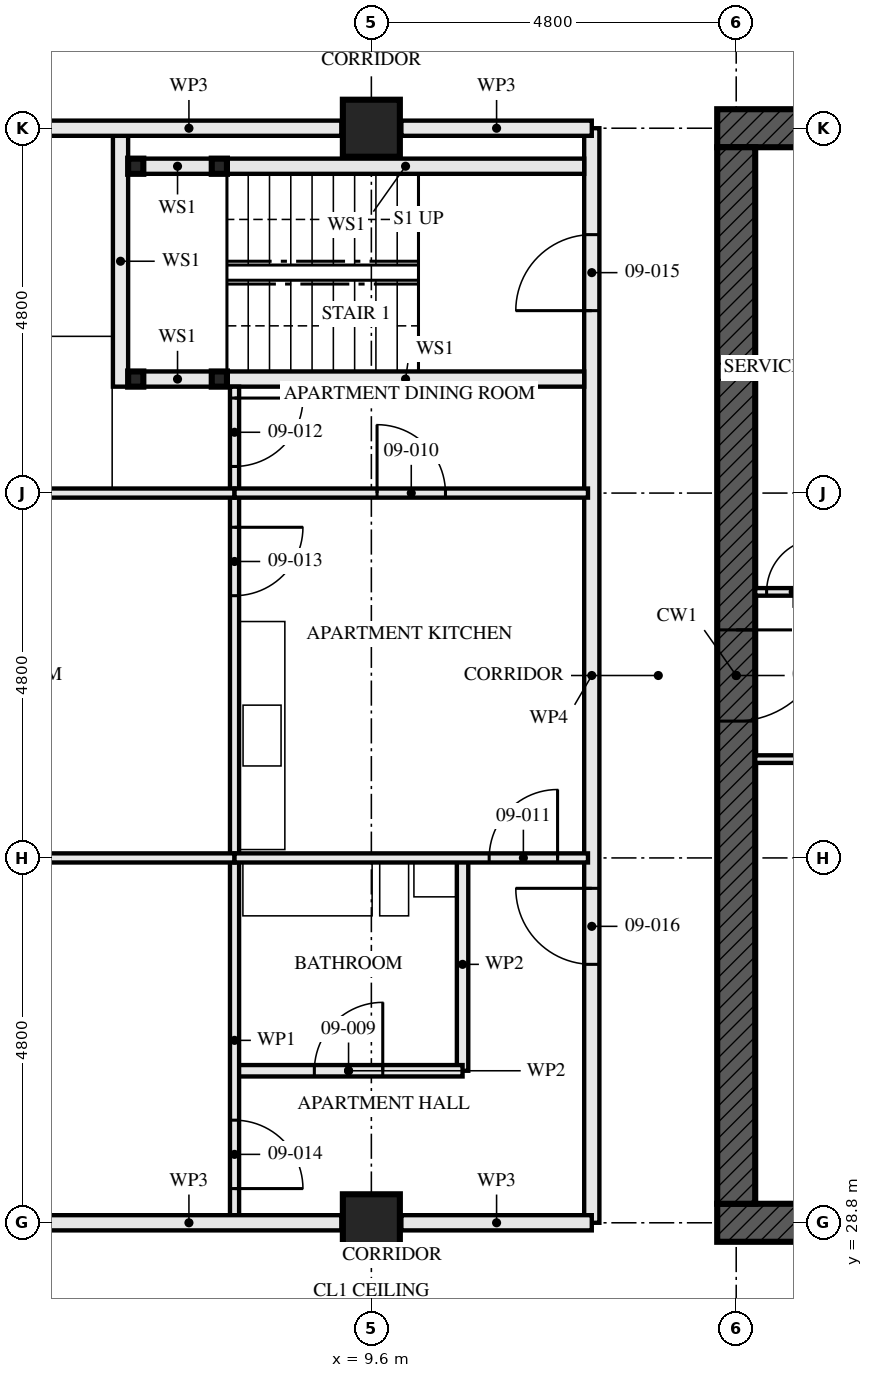
"""IFC4 building model, lengths in metres.
Left out: names, types, materials, properties, quantities, classifications, styles, units other than length and angle.
Written with IfcOpenShell. Run it as: python <this file> out.ifc"""

import sys

from ifc_helpers import new_model, si_unit, direction, frame, frame_2d, origin, origin_2d, place, context, subcontext, project, spatial, rectangle, hollow_rectangle, extrude, element, fill, save


model = new_model("IFC4")
c1 = context("Model", 3, precision=1e-05, world=origin(), true_north=direction((0.0, 1.0)))
c2 = subcontext(c1, "Body", "Model", "MODEL_VIEW")
j1 = project(units=[si_unit("LENGTHUNIT", "METRE"), si_unit("PLANEANGLEUNIT", "RADIAN")], contexts=[c1])
p1 = place(None, origin())
s1 = spatial("IfcSite", under=j1, at=p1, CompositionType="ELEMENT")
p2 = place(p1, origin())
s2 = spatial("IfcBuilding", under=s1, at=p2, CompositionType="ELEMENT")
p3 = place(p2, frame((0.0, 0.0, 37.5)))
s3 = spatial("IfcBuildingStorey", under=s2, at=p3, CompositionType="ELEMENT", Elevation=37.5)
for number, where, z_axis, x_axis in (
    (1, (9.6, 28.8, 0.0), (0.0, 0.0, 1.0), (0.0, 1.0, 0.0)),
    (2, (9.6, 43.2, 0.0), (0.0, 0.0, 1.0), (0.0, 1.0, 0.0)),
):
    element("IfcColumn", number, at=place(p3, frame(where, z_axis=z_axis, x_axis=x_axis)), inside=s3, PredefinedType="COLUMN", context=c2, shape_type="SweptSolid", body=[
        extrude(hollow_rectangle(XDim=0.75, YDim=0.75, WallThickness=0.08, at=origin_2d()), origin(), (0.0, 0.0, 1.0), 3.5),
    ])
p4 = place(p3, frame((14.15, 28.8, -0.17), z_axis=(0.0, 0.0, 1.0), x_axis=(1.0, 0.0, 0.0)))
e3 = element("IfcWall", 3, at=p4, inside=s3, PredefinedType="SHEAR", context=c2, shape_type="SweptSolid", body=[
    extrude(rectangle(XDim=14.9, YDim=0.5, at=frame_2d((7.45, 0.0))), origin(), (0.0, 0.0, 1.0), 3.5),
])
p5 = place(p4, frame((6.85, 0.0, 0.17)))
e4 = element("IfcOpeningElement", 4, at=p5, cuts=e3, PredefinedType="OPENING", context=c2, shape_type="SweptSolid", body=[
    extrude(rectangle(XDim=1.2, YDim=2.1, at=frame_2d((0.6, 1.05))), frame((0.0, 0.26, 0.0), z_axis=(0.0, -1.0, 0.0), x_axis=(1.0, 0.0, 0.0)), (0.0, 0.0, 1.0), 0.521),
])
p6 = place(p3, frame((29.05, 43.2, -0.17), z_axis=(0.0, 0.0, 1.0), x_axis=(-1.0, 0.0, 0.0)))
e5 = element("IfcWall", 5, at=p6, inside=s3, PredefinedType="SHEAR", context=c2, shape_type="SweptSolid", body=[
    extrude(rectangle(XDim=14.9, YDim=0.5, at=frame_2d((7.45, 0.0))), origin(), (0.0, 0.0, 1.0), 3.5),
])
p7 = place(p6, frame((6.85, 0.0, 0.17)))
e6 = element("IfcOpeningElement", 6, at=p7, cuts=e5, PredefinedType="OPENING", context=c2, shape_type="SweptSolid", body=[
    extrude(rectangle(XDim=1.2, YDim=2.1, at=frame_2d((0.6, 1.05))), frame((0.0, 0.26, 0.0), z_axis=(0.0, -1.0, 0.0), x_axis=(1.0, 0.0, 0.0)), (0.0, 0.0, 1.0), 0.521),
])
p8 = place(p3, frame((14.4, 42.95, -0.17), z_axis=(0.0, 0.0, 1.0), x_axis=(0.0, -1.0, 0.0)))
e7 = element("IfcWall", 7, at=p8, inside=s3, PredefinedType="SHEAR", context=c2, shape_type="SweptSolid", body=[
    extrude(rectangle(XDim=13.9, YDim=0.5, at=frame_2d((6.95, 0.0))), origin(), (0.0, 0.0, 1.0), 3.5),
])
p9 = place(p8, frame((6.35, 0.0, 0.17)))
e8 = element("IfcOpeningElement", 8, at=p9, cuts=e7, PredefinedType="OPENING", context=c2, shape_type="SweptSolid", body=[
    extrude(rectangle(XDim=1.2, YDim=2.1, at=frame_2d((0.6, 1.05))), frame((0.0, 0.26, 0.0), z_axis=(0.0, -1.0, 0.0), x_axis=(1.0, 0.0, 0.0)), (0.0, 0.0, 1.0), 0.521),
])
for number, where, z_axis, x_axis in (
    (9, (6.5, 42.7, 0.0), (0.0, 0.0, 1.0), (1.0, 0.0, 0.0)),
    (10, (6.5, 39.9, 0.0), (0.0, 0.0, 1.0), (1.0, 0.0, 0.0)),
    (11, (7.6, 42.7, 0.0), (0.0, 0.0, 1.0), (1.0, 0.0, 0.0)),
    (12, (7.6, 39.9, 0.0), (0.0, 0.0, 1.0), (1.0, 0.0, 0.0)),
):
    element("IfcColumn", number, at=place(p3, frame(where, z_axis=z_axis, x_axis=x_axis)), inside=s3, PredefinedType="COLUMN", context=c2, shape_type="SweptSolid", body=[
        extrude(hollow_rectangle(XDim=0.2, YDim=0.2, WallThickness=0.008, at=origin_2d()), origin(), (0.0, 0.0, 1.0), 3.33),
    ])
p10 = place(p3, frame((6.6, 42.7, 0.0), z_axis=(0.0, 0.0, 1.0), x_axis=(1.0, 0.0, 0.0)))
e13 = element("IfcWall", 13, at=p10, inside=s3, PredefinedType="SOLIDWALL", context=c2, shape_type="SweptSolid", body=[
    extrude(rectangle(XDim=0.9, YDim=0.2, at=frame_2d((0.45, 0.0))), origin(), (0.0, 0.0, 1.0), 2.99),
])
p11 = place(p3, frame((7.7, 42.7, 0.0), z_axis=(0.0, 0.0, 1.0), x_axis=(1.0, 0.0, 0.0)))
e14 = element("IfcWall", 14, at=p11, inside=s3, PredefinedType="SOLIDWALL", context=c2, shape_type="SweptSolid", body=[
    extrude(rectangle(XDim=4.7, YDim=0.2, at=frame_2d((2.35, 0.0))), origin(), (0.0, 0.0, 1.0), 2.99),
])
p12 = place(p3, frame((6.6, 39.9, 0.0), z_axis=(0.0, 0.0, 1.0), x_axis=(1.0, 0.0, 0.0)))
e15 = element("IfcWall", 15, at=p12, inside=s3, PredefinedType="SOLIDWALL", context=c2, shape_type="SweptSolid", body=[
    extrude(rectangle(XDim=0.9, YDim=0.2, at=frame_2d((0.45, 0.0))), origin(), (0.0, 0.0, 1.0), 2.99),
])
p13 = place(p3, frame((7.7, 39.9, 0.0), z_axis=(0.0, 0.0, 1.0), x_axis=(1.0, 0.0, 0.0)))
e16 = element("IfcWall", 16, at=p13, inside=s3, PredefinedType="SOLIDWALL", context=c2, shape_type="SweptSolid", body=[
    extrude(rectangle(XDim=4.7, YDim=0.2, at=frame_2d((2.35, 0.0))), origin(), (0.0, 0.0, 1.0), 2.99),
])
p14 = place(p3, frame((6.3, 43.1, 0.0), z_axis=(0.0, 0.0, 1.0), x_axis=(0.0, -1.0, 0.0)))
e17 = element("IfcWall", 17, at=p14, inside=s3, PredefinedType="SOLIDWALL", context=c2, shape_type="SweptSolid", body=[
    extrude(rectangle(XDim=3.3, YDim=0.2, at=frame_2d((1.65, 0.0))), origin(), (0.0, 0.0, 1.0), 3.33),
])
p15 = place(p3, frame((7.8, 30.8, 0.0), z_axis=(0.0, 0.0, 1.0), x_axis=(1.0, 0.0, 0.0)))
e18 = element("IfcWall", 18, at=p15, inside=s3, PredefinedType="PARTITIONING", context=c2, shape_type="SweptSolid", body=[
    extrude(rectangle(XDim=3.0, YDim=0.15, at=frame_2d((1.5, 0.0))), origin(), (0.0, 0.0, 1.0), 3.33),
])
p16 = place(p15, frame((1.05, 0.0, 0.0)))
e19 = element("IfcOpeningElement", 19, at=p16, cuts=e18, PredefinedType="OPENING", context=c2, shape_type="SweptSolid", body=[
    extrude(rectangle(XDim=0.9, YDim=2.1, at=frame_2d((0.45, 1.05))), frame((0.0, 0.085, 0.0), z_axis=(0.0, -1.0, 0.0), x_axis=(1.0, 0.0, 0.0)), (0.0, 0.0, 1.0), 0.171),
])
p17 = place(p3, frame((10.8, 33.6, 0.0), z_axis=(0.0, 0.0, 1.0), x_axis=(0.0, -1.0, 0.0)))
e20 = element("IfcWall", 20, at=p17, inside=s3, PredefinedType="PARTITIONING", context=c2, shape_type="SweptSolid", body=[
    extrude(rectangle(XDim=2.8, YDim=0.15, at=frame_2d((1.4, 0.0))), origin(), (0.0, 0.0, 1.0), 3.33),
])
p18 = place(p3, frame((7.8, 38.4, 0.0), z_axis=(0.0, 0.0, 1.0), x_axis=(1.0, 0.0, 0.0)))
e21 = element("IfcWall", 21, at=p18, inside=s3, PredefinedType="PARTITIONING", context=c2, shape_type="SweptSolid", body=[
    extrude(rectangle(XDim=4.65, YDim=0.12, at=frame_2d((2.325, 0.0))), origin(), (0.0, 0.0, 1.0), 2.55),
])
p19 = place(p18, frame((1.875, 0.0, 0.0)))
e22 = element("IfcOpeningElement", 22, at=p19, cuts=e21, PredefinedType="OPENING", context=c2, shape_type="SweptSolid", body=[
    extrude(rectangle(XDim=0.9, YDim=2.1, at=frame_2d((0.45, 1.05))), frame((0.0, 0.071, 0.0), z_axis=(0.0, -1.0, 0.0), x_axis=(1.0, 0.0, 0.0)), (0.0, 0.0, 1.0), 0.141),
])
p20 = place(p3, frame((7.8, 33.6, 0.0), z_axis=(0.0, 0.0, 1.0), x_axis=(1.0, 0.0, 0.0)))
e23 = element("IfcWall", 23, at=p20, inside=s3, PredefinedType="PARTITIONING", context=c2, shape_type="SweptSolid", body=[
    extrude(rectangle(XDim=4.65, YDim=0.12, at=frame_2d((2.325, 0.0))), origin(), (0.0, 0.0, 1.0), 2.55),
])
p21 = place(p20, frame((3.35, 0.0, 0.0)))
e24 = element("IfcOpeningElement", 24, at=p21, cuts=e23, PredefinedType="OPENING", context=c2, shape_type="SweptSolid", body=[
    extrude(rectangle(XDim=0.9, YDim=2.1, at=frame_2d((0.45, 1.05))), frame((0.0, 0.071, 0.0), z_axis=(0.0, -1.0, 0.0), x_axis=(1.0, 0.0, 0.0)), (0.0, 0.0, 1.0), 0.141),
])
p22 = place(p3, frame((7.8, 39.8, 0.0), z_axis=(0.0, 0.0, 1.0), x_axis=(0.0, -1.0, 0.0)))
e25 = element("IfcWall", 25, at=p22, inside=s3, PredefinedType="PARTITIONING", context=c2, shape_type="SweptSolid", body=[
    extrude(rectangle(XDim=1.4, YDim=0.12, at=frame_2d((0.7, 0.0))), origin(), (0.0, 0.0, 1.0), 3.33),
])
p23 = place(p22, frame((0.15, 0.0, 0.0)))
e26 = element("IfcOpeningElement", 26, at=p23, cuts=e25, PredefinedType="OPENING", context=c2, shape_type="SweptSolid", body=[
    extrude(rectangle(XDim=0.9, YDim=2.1, at=frame_2d((0.45, 1.05))), frame((0.0, 0.071, 0.0), z_axis=(0.0, -1.0, 0.0), x_axis=(1.0, 0.0, 0.0)), (0.0, 0.0, 1.0), 0.141),
])
p24 = place(p3, frame((7.8, 38.4, 0.0), z_axis=(0.0, 0.0, 1.0), x_axis=(0.0, -1.0, 0.0)))
e27 = element("IfcWall", 27, at=p24, inside=s3, PredefinedType="PARTITIONING", context=c2, shape_type="SweptSolid", body=[
    extrude(rectangle(XDim=4.8, YDim=0.12, at=frame_2d((2.4, 0.0))), origin(), (0.0, 0.0, 1.0), 3.33),
])
p25 = place(p24, frame((0.45, 0.0, 0.0)))
e28 = element("IfcOpeningElement", 28, at=p25, cuts=e27, PredefinedType="OPENING", context=c2, shape_type="SweptSolid", body=[
    extrude(rectangle(XDim=0.9, YDim=2.1, at=frame_2d((0.45, 1.05))), frame((0.0, 0.071, 0.0), z_axis=(0.0, -1.0, 0.0), x_axis=(1.0, 0.0, 0.0)), (0.0, 0.0, 1.0), 0.141),
])
p26 = place(p3, frame((7.8, 33.6, 0.0), z_axis=(0.0, 0.0, 1.0), x_axis=(0.0, -1.0, 0.0)))
e29 = element("IfcWall", 29, at=p26, inside=s3, PredefinedType="PARTITIONING", context=c2, shape_type="SweptSolid", body=[
    extrude(rectangle(XDim=4.8, YDim=0.12, at=frame_2d((2.4, 0.0))), origin(), (0.0, 0.0, 1.0), 3.33),
])
p27 = place(p26, frame((3.45, 0.0, 0.0)))
e30 = element("IfcOpeningElement", 30, at=p27, cuts=e29, PredefinedType="OPENING", context=c2, shape_type="SweptSolid", body=[
    extrude(rectangle(XDim=0.9, YDim=2.1, at=frame_2d((0.45, 1.05))), frame((0.0, 0.071, 0.0), z_axis=(0.0, -1.0, 0.0), x_axis=(1.0, 0.0, 0.0)), (0.0, 0.0, 1.0), 0.141),
])
for number, where, z_axis, x_axis in (
    (31, (0.395, 38.4, 0.0), (0.0, 0.0, 1.0), (1.0, 0.0, 0.0)),
    (32, (0.395, 33.6, 0.0), (0.0, 0.0, 1.0), (1.0, 0.0, 0.0)),
):
    element("IfcWall", number, at=place(p3, frame(where, z_axis=z_axis, x_axis=x_axis)), inside=s3, PredefinedType="PARTITIONING", context=c2, shape_type="SweptSolid", body=[
        extrude(rectangle(XDim=7.405, YDim=0.12, at=frame_2d((3.703, 0.0))), origin(), (0.0, 0.0, 1.0), 2.55),
    ])
p28 = place(p3, frame((12.5, 43.2, 0.0), z_axis=(0.0, 0.0, 1.0), x_axis=(0.0, -1.0, 0.0)))
e33 = element("IfcWall", 33, at=p28, inside=s3, PredefinedType="PARTITIONING", context=c2, shape_type="SweptSolid", body=[
    extrude(rectangle(XDim=14.4, YDim=0.2, at=frame_2d((7.2, 0.0))), origin(), (0.0, 0.0, 1.0), 2.55),
])
p29 = place(p28, frame((1.4, 0.0, 0.0)))
e34 = element("IfcOpeningElement", 34, at=p29, cuts=e33, PredefinedType="OPENING", context=c2, shape_type="SweptSolid", body=[
    extrude(rectangle(XDim=1.0, YDim=2.1, at=frame_2d((0.5, 1.05))), frame((0.0, 0.111, 0.0), z_axis=(0.0, -1.0, 0.0), x_axis=(1.0, 0.0, 0.0)), (0.0, 0.0, 1.0), 0.221),
])
p30 = place(p28, frame((10.0, 0.0, 0.0)))
e35 = element("IfcOpeningElement", 35, at=p30, cuts=e33, PredefinedType="OPENING", context=c2, shape_type="SweptSolid", body=[
    extrude(rectangle(XDim=1.0, YDim=2.1, at=frame_2d((0.5, 1.05))), frame((0.0, 0.111, 0.0), z_axis=(0.0, -1.0, 0.0), x_axis=(1.0, 0.0, 0.0)), (0.0, 0.0, 1.0), 0.221),
])
p31 = place(p3, frame((14.65, 34.9, 0.0), z_axis=(0.0, 0.0, 1.0), x_axis=(1.0, 0.0, 0.0)))
e36 = element("IfcWall", 36, at=p31, inside=s3, PredefinedType="SOLIDWALL", context=c2, shape_type="SweptSolid", body=[
    extrude(rectangle(XDim=5.9, YDim=0.1, at=frame_2d((2.95, 0.0))), origin(), (0.0, 0.0, 1.0), 3.33),
])
p32 = place(p31, frame((1.6, 0.0, 0.0)))
e37 = element("IfcOpeningElement", 37, at=p32, cuts=e36, PredefinedType="OPENING", context=c2, shape_type="SweptSolid", body=[
    extrude(rectangle(XDim=0.7, YDim=2.1, at=frame_2d((0.35, 1.05))), frame((0.0, 0.061, 0.0), z_axis=(0.0, -1.0, 0.0), x_axis=(1.0, 0.0, 0.0)), (0.0, 0.0, 1.0), 0.121),
])
p33 = place(p3, frame((14.65, 37.1, 0.0), z_axis=(0.0, 0.0, 1.0), x_axis=(1.0, 0.0, 0.0)))
e38 = element("IfcWall", 38, at=p33, inside=s3, PredefinedType="SOLIDWALL", context=c2, shape_type="SweptSolid", body=[
    extrude(rectangle(XDim=5.9, YDim=0.1, at=frame_2d((2.95, 0.0))), origin(), (0.0, 0.0, 1.0), 3.33),
])
p34 = place(p33, frame((0.15, 0.0, 0.0)))
e39 = element("IfcOpeningElement", 39, at=p34, cuts=e38, PredefinedType="OPENING", context=c2, shape_type="SweptSolid", body=[
    extrude(rectangle(XDim=0.7, YDim=2.1, at=frame_2d((0.35, 1.05))), frame((0.0, 0.061, 0.0), z_axis=(0.0, -1.0, 0.0), x_axis=(1.0, 0.0, 0.0)), (0.0, 0.0, 1.0), 0.121),
])
p35 = place(p33, frame((1.5, 0.0, 0.0)))
e40 = element("IfcOpeningElement", 40, at=p35, cuts=e38, PredefinedType="OPENING", context=c2, shape_type="SweptSolid", body=[
    extrude(rectangle(XDim=0.9, YDim=2.1, at=frame_2d((0.45, 1.05))), frame((0.0, 0.061, 0.0), z_axis=(0.0, -1.0, 0.0), x_axis=(1.0, 0.0, 0.0)), (0.0, 0.0, 1.0), 0.121),
])
p36 = place(p3, frame((12.5, 28.8, 0.0), z_axis=(0.0, 0.0, 1.0), x_axis=(-1.0, 0.0, 0.0)))
e41 = element("IfcWall", 41, at=p36, inside=s3, PredefinedType="PARTITIONING", context=c2, shape_type="SweptSolid", body=[
    extrude(rectangle(XDim=2.505, YDim=0.2, at=frame_2d((1.252, 0.0))), origin(), (0.0, 0.0, 1.0), 2.32),
])
p37 = place(p3, frame((9.205, 28.8, 0.0), z_axis=(0.0, 0.0, 1.0), x_axis=(-1.0, 0.0, 0.0)))
e42 = element("IfcWall", 42, at=p37, inside=s3, PredefinedType="PARTITIONING", context=c2, shape_type="SweptSolid", body=[
    extrude(rectangle(XDim=4.01, YDim=0.2, at=frame_2d((2.005, 0.0))), origin(), (0.0, 0.0, 1.0), 2.32),
])
p38 = place(p3, frame((12.5, 43.2, 0.0), z_axis=(0.0, 0.0, 1.0), x_axis=(-1.0, 0.0, 0.0)))
e43 = element("IfcWall", 43, at=p38, inside=s3, PredefinedType="PARTITIONING", context=c2, shape_type="SweptSolid", body=[
    extrude(rectangle(XDim=2.505, YDim=0.2, at=frame_2d((1.252, 0.0))), origin(), (0.0, 0.0, 1.0), 2.32),
])
p39 = place(p3, frame((9.205, 43.2, 0.0), z_axis=(0.0, 0.0, 1.0), x_axis=(-1.0, 0.0, 0.0)))
e44 = element("IfcWall", 44, at=p39, inside=s3, PredefinedType="PARTITIONING", context=c2, shape_type="SweptSolid", body=[
    extrude(rectangle(XDim=4.01, YDim=0.2, at=frame_2d((2.005, 0.0))), origin(), (0.0, 0.0, 1.0), 2.32),
])
p40 = place(p16, origin())
e45 = element("IfcDoor", 45, at=p40, inside=s3, OperationType="SINGLE_SWING_LEFT", PredefinedType="DOOR", context=c2, shape_type="SweptSolid", body=[
    extrude(rectangle(XDim=0.9, YDim=2.1, at=frame_2d((0.45, 1.05))), frame((0.0, 0.022, 0.0), z_axis=(0.0, -1.0, 0.0), x_axis=(1.0, 0.0, 0.0)), (0.0, 0.0, 1.0), 0.044),
])
fill(e19, e45)
p41 = place(p19, origin())
e46 = element("IfcDoor", 46, at=p41, inside=s3, OperationType="SINGLE_SWING_RIGHT", PredefinedType="DOOR", context=c2, shape_type="SweptSolid", body=[
    extrude(rectangle(XDim=0.9, YDim=2.1, at=frame_2d((0.45, 1.05))), frame((0.0, 0.022, 0.0), z_axis=(0.0, -1.0, 0.0), x_axis=(1.0, 0.0, 0.0)), (0.0, 0.0, 1.0), 0.044),
])
fill(e22, e46)
p42 = place(p21, origin())
e47 = element("IfcDoor", 47, at=p42, inside=s3, OperationType="SINGLE_SWING_LEFT", PredefinedType="DOOR", context=c2, shape_type="SweptSolid", body=[
    extrude(rectangle(XDim=0.9, YDim=2.1, at=frame_2d((0.45, 1.05))), frame((0.0, 0.022, 0.0), z_axis=(0.0, -1.0, 0.0), x_axis=(1.0, 0.0, 0.0)), (0.0, 0.0, 1.0), 0.044),
])
fill(e24, e47)
p43 = place(p23, origin())
e48 = element("IfcDoor", 48, at=p43, inside=s3, OperationType="SINGLE_SWING_RIGHT", PredefinedType="DOOR", context=c2, shape_type="SweptSolid", body=[
    extrude(rectangle(XDim=0.9, YDim=2.1, at=frame_2d((0.45, 1.05))), frame((0.0, 0.022, 0.0), z_axis=(0.0, -1.0, 0.0), x_axis=(1.0, 0.0, 0.0)), (0.0, 0.0, 1.0), 0.044),
])
fill(e26, e48)
p44 = place(p25, origin())
e49 = element("IfcDoor", 49, at=p44, inside=s3, OperationType="SINGLE_SWING_RIGHT", PredefinedType="DOOR", context=c2, shape_type="SweptSolid", body=[
    extrude(rectangle(XDim=0.9, YDim=2.1, at=frame_2d((0.45, 1.05))), frame((0.0, 0.022, 0.0), z_axis=(0.0, -1.0, 0.0), x_axis=(1.0, 0.0, 0.0)), (0.0, 0.0, 1.0), 0.044),
])
fill(e28, e49)
p45 = place(p27, origin())
e50 = element("IfcDoor", 50, at=p45, inside=s3, OperationType="SINGLE_SWING_LEFT", PredefinedType="DOOR", context=c2, shape_type="SweptSolid", body=[
    extrude(rectangle(XDim=0.9, YDim=2.1, at=frame_2d((0.45, 1.05))), frame((0.0, 0.022, 0.0), z_axis=(0.0, -1.0, 0.0), x_axis=(1.0, 0.0, 0.0)), (0.0, 0.0, 1.0), 0.044),
])
fill(e30, e50)
p46 = place(p29, frame((1.0, 0.0, 0.0), z_axis=(0.0, 0.0, 1.0), x_axis=(-1.0, 0.0, 0.0)))
e51 = element("IfcDoor", 51, at=p46, inside=s3, OperationType="SINGLE_SWING_RIGHT", PredefinedType="DOOR", context=c2, shape_type="SweptSolid", body=[
    extrude(rectangle(XDim=1.0, YDim=2.1, at=frame_2d((0.5, 1.05))), frame((0.0, 0.032, 0.0), z_axis=(0.0, -1.0, 0.0), x_axis=(1.0, 0.0, 0.0)), (0.0, 0.0, 1.0), 0.064),
])
fill(e34, e51)
p47 = place(p30, frame((1.0, 0.0, 0.0), z_axis=(0.0, 0.0, 1.0), x_axis=(-1.0, 0.0, 0.0)))
e52 = element("IfcDoor", 52, at=p47, inside=s3, OperationType="SINGLE_SWING_LEFT", PredefinedType="DOOR", context=c2, shape_type="SweptSolid", body=[
    extrude(rectangle(XDim=1.0, YDim=2.1, at=frame_2d((0.5, 1.05))), frame((0.0, 0.027, 0.0), z_axis=(0.0, -1.0, 0.0), x_axis=(1.0, 0.0, 0.0)), (0.0, 0.0, 1.0), 0.054),
])
fill(e35, e52)
p48 = place(p34, origin())
e53 = element("IfcDoor", 53, at=p48, inside=s3, OperationType="SINGLE_SWING_LEFT", PredefinedType="DOOR", context=c2, shape_type="SweptSolid", body=[
    extrude(rectangle(XDim=0.7, YDim=2.1, at=frame_2d((0.35, 1.05))), frame((0.0, 0.027, 0.0), z_axis=(0.0, -1.0, 0.0), x_axis=(1.0, 0.0, 0.0)), (0.0, 0.0, 1.0), 0.054),
])
fill(e39, e53)
p49 = place(p9, origin())
e54 = element("IfcDoor", 54, at=p49, inside=s3, OperationType="SINGLE_SWING_LEFT", PredefinedType="DOOR", context=c2, shape_type="SweptSolid", body=[
    extrude(rectangle(XDim=1.2, YDim=2.1, at=frame_2d((0.6, 1.05))), frame((0.0, 0.027, 0.0), z_axis=(0.0, -1.0, 0.0), x_axis=(1.0, 0.0, 0.0)), (0.0, 0.0, 1.0), 0.054),
])
fill(e8, e54)
save(model, sys.argv[1])
